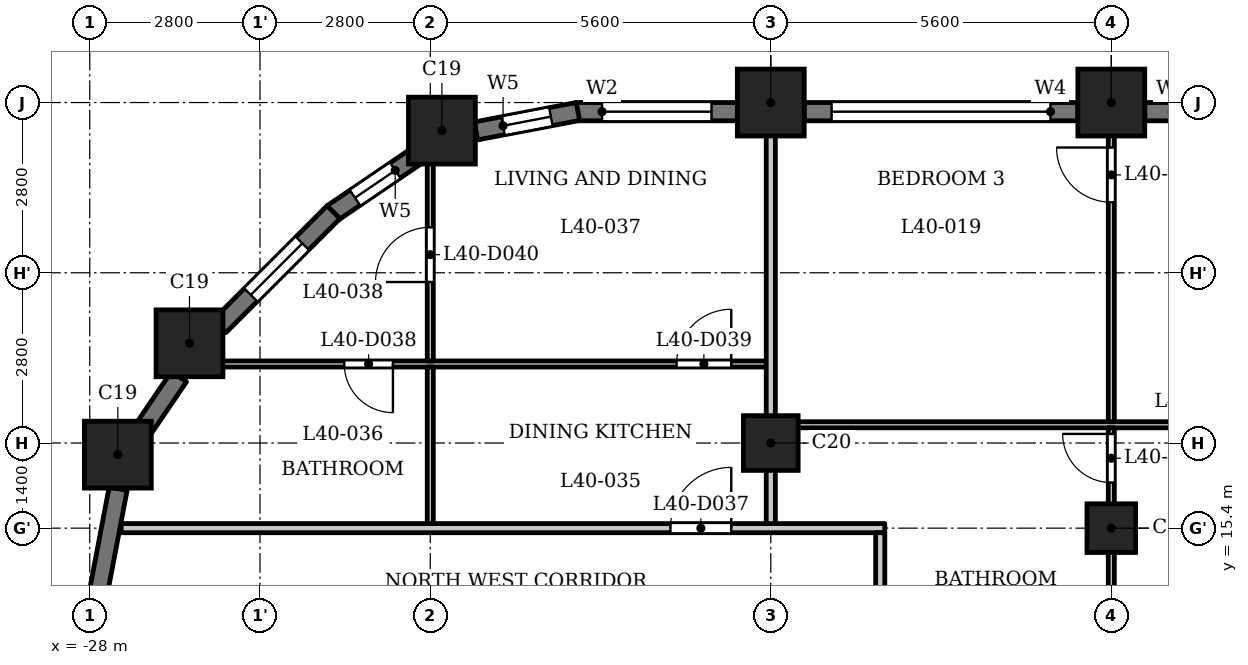
"""IFC4 building model, lengths in metres.
Left out: names, types, materials, properties, quantities, classifications, styles, units other than length and angle.
Written with IfcOpenShell. Run it as: python <this file> out.ifc"""

import sys

from ifc_helpers import new_model, si_unit, direction, frame, frame_2d, origin, origin_2d, place, context, subcontext, project, spatial, rectangle, extrude, element, fill, save


model = new_model("IFC4")
c1 = context("Model", 3, precision=1e-05, world=origin(), true_north=direction((0.0, 1.0)))
c2 = subcontext(c1, "Body", "Model", "MODEL_VIEW")
j1 = project(units=[si_unit("LENGTHUNIT", "METRE"), si_unit("PLANEANGLEUNIT", "RADIAN")], contexts=[c1])
p1 = place(None, origin())
s1 = spatial("IfcSite", under=j1, at=p1, CompositionType="ELEMENT")
p2 = place(p1, origin())
s2 = spatial("IfcBuilding", under=s1, at=p2, CompositionType="ELEMENT")
p3 = place(p2, frame((0.0, 0.0, 157.1)))
s3 = spatial("IfcBuildingStorey", under=s2, at=p3, CompositionType="ELEMENT", Elevation=157.1)
for number, where, z_axis, x_axis in (
    (1, (-11.2, 22.4, 0.0), (0.0, 0.0, 1.0), (1.0, 0.0, 0.0)),
    (2, (-16.8, 22.4, 0.0), (0.0, 0.0, 1.0), (1.0, 0.0, 0.0)),
    (3, (-22.209, 21.938, 0.0), (0.0, 0.0, 1.0), (1.0, 0.0, 0.0)),
    (4, (-26.36, 18.44, 0.0), (0.0, 0.0, 1.0), (1.0, 0.0, 0.0)),
    (5, (-27.538, 16.609, 0.0), (0.0, 0.0, 1.0), (1.0, 0.0, 0.0)),
):
    element("IfcColumn", number, at=place(p3, frame(where, z_axis=z_axis, x_axis=x_axis)), inside=s3, PredefinedType="COLUMN", context=c2, shape_type="SweptSolid", body=[
        extrude(rectangle(XDim=1.1, YDim=1.1, at=origin_2d()), origin(), (0.0, 0.0, 1.0), 3.5),
    ])
p4 = place(p3, frame((-16.8, 16.8, 0.0), z_axis=(0.0, 0.0, 1.0), x_axis=(1.0, 0.0, 0.0)))
e6 = element("IfcColumn", 6, at=p4, inside=s3, PredefinedType="COLUMN", context=c2, shape_type="SweptSolid", body=[
    extrude(rectangle(XDim=0.9, YDim=0.9, at=origin_2d()), origin(), (0.0, 0.0, 1.0), 3.5),
])
p5 = place(p3, frame((-11.2, 15.4, 0.0), z_axis=(0.0, 0.0, 1.0), x_axis=(1.0, 0.0, 0.0)))
e7 = element("IfcColumn", 7, at=p5, inside=s3, PredefinedType="COLUMN", context=c2, shape_type="SweptSolid", body=[
    extrude(rectangle(XDim=0.8, YDim=0.8, at=origin_2d()), origin(), (0.0, 0.0, 1.0), 3.5),
])
p6 = place(p3, frame((-6.15, 22.25, 0.0), z_axis=(0.0, 0.0, 1.0), x_axis=(-1.0, 0.0, 0.0)))
e8 = element("IfcWall", 8, at=p6, inside=s3, PredefinedType="SOLIDWALL", context=c2, shape_type="SweptSolid", body=[
    extrude(rectangle(XDim=4.5, YDim=0.3, at=frame_2d((2.25, 0.0))), origin(), (0.0, 0.0, 1.0), 2.45),
])
p7 = place(p6, frame((0.45, 0.0, 1.2)))
e9 = element("IfcOpeningElement", 9, at=p7, cuts=e8, PredefinedType="OPENING", context=c2, shape_type="SweptSolid", body=[
    extrude(rectangle(XDim=3.6, YDim=0.95, at=frame_2d((1.8, 0.475))), frame((0.0, 0.16, 0.0), z_axis=(0.0, -1.0, 0.0), x_axis=(1.0, 0.0, 0.0)), (0.0, 0.0, 1.0), 0.32),
])
p8 = place(p3, frame((-11.75, 22.25, 0.0), z_axis=(0.0, 0.0, 1.0), x_axis=(-1.0, 0.0, 0.0)))
e10 = element("IfcWall", 10, at=p8, inside=s3, PredefinedType="SOLIDWALL", context=c2, shape_type="SweptSolid", body=[
    extrude(rectangle(XDim=4.5, YDim=0.3, at=frame_2d((2.25, 0.0))), origin(), (0.0, 0.0, 1.0), 2.45),
])
p9 = place(p8, frame((0.45, 0.0, 1.2)))
e11 = element("IfcOpeningElement", 11, at=p9, cuts=e10, PredefinedType="OPENING", context=c2, shape_type="SweptSolid", body=[
    extrude(rectangle(XDim=3.6, YDim=0.95, at=frame_2d((1.8, 0.475))), frame((0.0, 0.16, 0.0), z_axis=(0.0, -1.0, 0.0), x_axis=(1.0, 0.0, 0.0)), (0.0, 0.0, 1.0), 0.32),
])
p10 = place(p3, frame((-17.35, 22.25, 0.0), z_axis=(0.0, 0.0, 1.0), x_axis=(-1.0, 0.0, 0.0)))
e12 = element("IfcWall", 12, at=p10, inside=s3, PredefinedType="SOLIDWALL", context=c2, shape_type="SweptSolid", body=[
    extrude(rectangle(XDim=2.65, YDim=0.3, at=frame_2d((1.325, 0.0))), origin(), (0.0, 0.0, 1.0), 2.45),
])
p11 = place(p10, frame((0.425, 0.0, 0.9)))
e13 = element("IfcOpeningElement", 13, at=p11, cuts=e12, PredefinedType="OPENING", context=c2, shape_type="SweptSolid", body=[
    extrude(rectangle(XDim=1.8, YDim=1.25, at=frame_2d((0.9, 0.625))), frame((0.0, 0.16, 0.0), z_axis=(0.0, -1.0, 0.0), x_axis=(1.0, 0.0, 0.0)), (0.0, 0.0, 1.0), 0.32),
])
p12 = place(p3, frame((-19.972, 22.253, 0.0), z_axis=(0.0, 0.0, 1.0), x_axis=(-0.982297206936, -0.187329114784, 0.0)))
e14 = element("IfcWall", 14, at=p12, inside=s3, PredefinedType="SOLIDWALL", context=c2, shape_type="SweptSolid", body=[
    extrude(rectangle(XDim=1.706, YDim=0.3, at=frame_2d((0.853, 0.0))), origin(), (0.0, 0.0, 1.0), 2.45),
])
p13 = place(p12, frame((0.453, 0.0, 0.6)))
e15 = element("IfcOpeningElement", 15, at=p13, cuts=e14, PredefinedType="OPENING", context=c2, shape_type="SweptSolid", body=[
    extrude(rectangle(XDim=0.8, YDim=1.55, at=frame_2d((0.4, 0.775))), frame((0.0, 0.16, 0.0), z_axis=(0.0, -1.0, 0.0), x_axis=(1.0, 0.0, 0.0)), (0.0, 0.0, 1.0), 0.32),
])
p14 = place(p3, frame((-22.602, 21.538, 0.0), z_axis=(0.0, 0.0, 1.0), x_axis=(-0.827040942766, -0.562141689424, 0.0)))
e16 = element("IfcWall", 16, at=p14, inside=s3, PredefinedType="SOLIDWALL", context=c2, shape_type="SweptSolid", body=[
    extrude(rectangle(XDim=1.706, YDim=0.3, at=frame_2d((0.853, 0.0))), origin(), (0.0, 0.0, 1.0), 2.45),
])
p15 = place(p14, frame((0.453, 0.0, 0.6)))
e17 = element("IfcOpeningElement", 17, at=p15, cuts=e16, PredefinedType="OPENING", context=c2, shape_type="SweptSolid", body=[
    extrude(rectangle(XDim=0.8, YDim=1.55, at=frame_2d((0.4, 0.775))), frame((0.0, 0.16, 0.0), z_axis=(0.0, -1.0, 0.0), x_axis=(1.0, 0.0, 0.0)), (0.0, 0.0, 1.0), 0.32),
])
p16 = place(p3, frame((-23.991, 20.597, 0.0), z_axis=(0.0, 0.0, 1.0), x_axis=(-0.707106781187, -0.707106781187, 0.0)))
e18 = element("IfcWall", 18, at=p16, inside=s3, PredefinedType="SOLIDWALL", context=c2, shape_type="SweptSolid", body=[
    extrude(rectangle(XDim=2.65, YDim=0.3, at=frame_2d((1.325, 0.0))), origin(), (0.0, 0.0, 1.0), 2.45),
])
p17 = place(p16, frame((0.725, 0.0, 0.6)))
e19 = element("IfcOpeningElement", 19, at=p17, cuts=e18, PredefinedType="OPENING", context=c2, shape_type="SweptSolid", body=[
    extrude(rectangle(XDim=1.2, YDim=1.55, at=frame_2d((0.6, 0.775))), frame((0.0, 0.16, 0.0), z_axis=(0.0, -1.0, 0.0), x_axis=(1.0, 0.0, 0.0)), (0.0, 0.0, 1.0), 0.32),
])
p18 = place(p3, frame((-26.532, 17.893, 0.0), z_axis=(0.0, 0.0, 1.0), x_axis=(-0.562105419172, -0.82706559458, 0.0)))
e20 = element("IfcWall", 20, at=p18, inside=s3, PredefinedType="SOLIDWALL", context=c2, shape_type="SweptSolid", body=[
    extrude(rectangle(XDim=1.077, YDim=0.3, at=frame_2d((0.539, 0.0))), origin(), (0.0, 0.0, 1.0), 3.2),
])
p19 = place(p3, frame((-27.533, 16.048, 0.0), z_axis=(0.0, 0.0, 1.0), x_axis=(-0.187302784601, -0.982302227871, 0.0)))
e21 = element("IfcWall", 21, at=p19, inside=s3, PredefinedType="SOLIDWALL", context=c2, shape_type="SweptSolid", body=[
    extrude(rectangle(XDim=1.706, YDim=0.3, at=frame_2d((0.853, 0.0))), origin(), (0.0, 0.0, 1.0), 2.45),
])
p20 = place(p3, frame((-27.484, 15.4, 0.0), z_axis=(0.0, 0.0, 1.0), x_axis=(1.0, 0.0, 0.0)))
e22 = element("IfcWall", 22, at=p20, inside=s3, PredefinedType="PARTITIONING", context=c2, shape_type="SweptSolid", body=[
    extrude(rectangle(XDim=12.559, YDim=0.15, at=frame_2d((6.279, 0.0))), origin(), (0.0, 0.0, 1.0), 3.2),
])
p21 = place(p20, frame((9.034, 0.0, 0.0)))
e23 = element("IfcOpeningElement", 23, at=p21, cuts=e22, PredefinedType="OPENING", context=c2, shape_type="SweptSolid", body=[
    extrude(rectangle(XDim=1.0, YDim=2.1, at=frame_2d((0.5, 1.05))), frame((0.0, 0.085, 0.0), z_axis=(0.0, -1.0, 0.0), x_axis=(1.0, 0.0, 0.0)), (0.0, 0.0, 1.0), 0.17),
])
p22 = place(p3, frame((-16.725, 17.1, 0.0), z_axis=(0.0, 0.0, 1.0), x_axis=(1.0, 0.0, 0.0)))
e24 = element("IfcWall", 24, at=p22, inside=s3, PredefinedType="PARTITIONING", context=c2, shape_type="SweptSolid", body=[
    extrude(rectangle(XDim=33.45, YDim=0.1, at=frame_2d((16.725, 0.0))), origin(), (0.0, 0.0, 1.0), 3.2),
])
p23 = place(p22, frame((11.925, 0.0, 0.0)))
e25 = element("IfcOpeningElement", 25, at=p23, cuts=e24, PredefinedType="OPENING", context=c2, shape_type="SweptSolid", body=[
    extrude(rectangle(XDim=0.9, YDim=2.1, at=frame_2d((0.45, 1.05))), frame((0.0, 0.06, 0.0), z_axis=(0.0, -1.0, 0.0), x_axis=(1.0, 0.0, 0.0)), (0.0, 0.0, 1.0), 0.12),
])
p24 = place(p22, frame((15.175, 0.0, 0.0)))
e26 = element("IfcOpeningElement", 26, at=p24, cuts=e24, PredefinedType="OPENING", context=c2, shape_type="SweptSolid", body=[
    extrude(rectangle(XDim=0.9, YDim=2.1, at=frame_2d((0.45, 1.05))), frame((0.0, 0.06, 0.0), z_axis=(0.0, -1.0, 0.0), x_axis=(1.0, 0.0, 0.0)), (0.0, 0.0, 1.0), 0.12),
])
p25 = place(p22, frame((6.575, 0.0, 0.0)))
e27 = element("IfcOpeningElement", 27, at=p25, cuts=e24, PredefinedType="OPENING", context=c2, shape_type="SweptSolid", body=[
    extrude(rectangle(XDim=0.9, YDim=2.1, at=frame_2d((0.45, 1.05))), frame((0.0, 0.06, 0.0), z_axis=(0.0, -1.0, 0.0), x_axis=(1.0, 0.0, 0.0)), (0.0, 0.0, 1.0), 0.12),
])
p26 = place(p22, frame((17.375, 0.0, 0.0)))
e28 = element("IfcOpeningElement", 28, at=p26, cuts=e24, PredefinedType="OPENING", context=c2, shape_type="SweptSolid", body=[
    extrude(rectangle(XDim=0.8, YDim=2.1, at=frame_2d((0.4, 1.05))), frame((0.0, 0.06, 0.0), z_axis=(0.0, -1.0, 0.0), x_axis=(1.0, 0.0, 0.0)), (0.0, 0.0, 1.0), 0.12),
])
p27 = place(p22, frame((20.025, 0.0, 0.0)))
e29 = element("IfcOpeningElement", 29, at=p27, cuts=e24, PredefinedType="OPENING", context=c2, shape_type="SweptSolid", body=[
    extrude(rectangle(XDim=0.9, YDim=2.1, at=frame_2d((0.45, 1.05))), frame((0.0, 0.06, 0.0), z_axis=(0.0, -1.0, 0.0), x_axis=(1.0, 0.0, 0.0)), (0.0, 0.0, 1.0), 0.12),
])
p28 = place(p22, frame((26.425, 0.0, 0.0)))
e30 = element("IfcOpeningElement", 30, at=p28, cuts=e24, PredefinedType="OPENING", context=c2, shape_type="SweptSolid", body=[
    extrude(rectangle(XDim=0.8, YDim=2.1, at=frame_2d((0.4, 1.05))), frame((0.0, 0.06, 0.0), z_axis=(0.0, -1.0, 0.0), x_axis=(1.0, 0.0, 0.0)), (0.0, 0.0, 1.0), 0.12),
])
p29 = place(p22, frame((23.025, 0.0, 0.0)))
e31 = element("IfcOpeningElement", 31, at=p29, cuts=e24, PredefinedType="OPENING", context=c2, shape_type="SweptSolid", body=[
    extrude(rectangle(XDim=0.9, YDim=2.1, at=frame_2d((0.45, 1.05))), frame((0.0, 0.06, 0.0), z_axis=(0.0, -1.0, 0.0), x_axis=(1.0, 0.0, 0.0)), (0.0, 0.0, 1.0), 0.12),
])
p30 = place(p22, frame((28.575, 0.0, 0.0)))
e32 = element("IfcOpeningElement", 32, at=p30, cuts=e24, PredefinedType="OPENING", context=c2, shape_type="SweptSolid", body=[
    extrude(rectangle(XDim=0.8, YDim=2.1, at=frame_2d((0.4, 1.05))), frame((0.0, 0.06, 0.0), z_axis=(0.0, -1.0, 0.0), x_axis=(1.0, 0.0, 0.0)), (0.0, 0.0, 1.0), 0.12),
])
p31 = place(p22, frame((30.725, 0.0, 0.0)))
e33 = element("IfcOpeningElement", 33, at=p31, cuts=e24, PredefinedType="OPENING", context=c2, shape_type="SweptSolid", body=[
    extrude(rectangle(XDim=0.9, YDim=2.1, at=frame_2d((0.45, 1.05))), frame((0.0, 0.06, 0.0), z_axis=(0.0, -1.0, 0.0), x_axis=(1.0, 0.0, 0.0)), (0.0, 0.0, 1.0), 0.12),
])
p32 = place(p3, frame((-26.44, 18.1, 0.0), z_axis=(0.0, 0.0, 1.0), x_axis=(1.0, 0.0, 0.0)))
e34 = element("IfcWall", 34, at=p32, inside=s3, PredefinedType="PARTITIONING", context=c2, shape_type="SweptSolid", body=[
    extrude(rectangle(XDim=9.565, YDim=0.1, at=frame_2d((4.782, 0.0))), origin(), (0.0, 0.0, 1.0), 3.2),
])
p33 = place(p32, frame((2.626, 0.0, 0.0)))
e35 = element("IfcOpeningElement", 35, at=p33, cuts=e34, PredefinedType="OPENING", context=c2, shape_type="SweptSolid", body=[
    extrude(rectangle(XDim=0.8, YDim=2.1, at=frame_2d((0.4, 1.05))), frame((0.0, 0.06, 0.0), z_axis=(0.0, -1.0, 0.0), x_axis=(1.0, 0.0, 0.0)), (0.0, 0.0, 1.0), 0.12),
])
p34 = place(p32, frame((8.09, 0.0, 0.0)))
e36 = element("IfcOpeningElement", 36, at=p34, cuts=e34, PredefinedType="OPENING", context=c2, shape_type="SweptSolid", body=[
    extrude(rectangle(XDim=0.9, YDim=2.1, at=frame_2d((0.45, 1.05))), frame((0.0, 0.06, 0.0), z_axis=(0.0, -1.0, 0.0), x_axis=(1.0, 0.0, 0.0)), (0.0, 0.0, 1.0), 0.12),
])
p35 = place(p3, frame((-22.4, 15.475, 0.0), z_axis=(0.0, 0.0, 1.0), x_axis=(0.0, 1.0, 0.0)))
e37 = element("IfcWall", 37, at=p35, inside=s3, PredefinedType="PARTITIONING", context=c2, shape_type="SweptSolid", body=[
    extrude(rectangle(XDim=2.575, YDim=0.1, at=frame_2d((1.288, 0.0))), origin(), (0.0, 0.0, 1.0), 3.2),
])
p36 = place(p3, frame((-22.4, 18.15, 0.0), z_axis=(0.0, 0.0, 1.0), x_axis=(0.0, 1.0, 0.0)))
e38 = element("IfcWall", 38, at=p36, inside=s3, PredefinedType="PARTITIONING", context=c2, shape_type="SweptSolid", body=[
    extrude(rectangle(XDim=3.57, YDim=0.1, at=frame_2d((1.785, 0.0))), origin(), (0.0, 0.0, 1.0), 3.2),
])
p37 = place(p36, frame((1.298, 0.0, 0.0)))
e39 = element("IfcOpeningElement", 39, at=p37, cuts=e38, PredefinedType="OPENING", context=c2, shape_type="SweptSolid", body=[
    extrude(rectangle(XDim=0.9, YDim=2.1, at=frame_2d((0.45, 1.05))), frame((0.0, 0.06, 0.0), z_axis=(0.0, -1.0, 0.0), x_axis=(1.0, 0.0, 0.0)), (0.0, 0.0, 1.0), 0.12),
])
p38 = place(p3, frame((-16.8, 15.475, 0.0), z_axis=(0.0, 0.0, 1.0), x_axis=(0.0, 1.0, 0.0)))
e40 = element("IfcWall", 40, at=p38, inside=s3, PredefinedType="PARTITIONING", context=c2, shape_type="SweptSolid", body=[
    extrude(rectangle(XDim=7.455, YDim=0.15, at=frame_2d((3.728, 0.0))), origin(), (0.0, 0.0, 1.0), 3.2),
])
p39 = place(p3, frame((-15.0, 13.275, 0.0), z_axis=(0.0, 0.0, 1.0), x_axis=(0.0, 1.0, 0.0)))
e41 = element("IfcWall", 41, at=p39, inside=s3, PredefinedType="PARTITIONING", context=c2, shape_type="SweptSolid", body=[
    extrude(rectangle(XDim=2.05, YDim=0.15, at=frame_2d((1.025, 0.0))), origin(), (0.0, 0.0, 1.0), 3.2),
])
p40 = place(p3, frame((-11.2, 13.275, 0.0), z_axis=(0.0, 0.0, 1.0), x_axis=(0.0, 1.0, 0.0)))
e42 = element("IfcWall", 42, at=p40, inside=s3, PredefinedType="PARTITIONING", context=c2, shape_type="SweptSolid", body=[
    extrude(rectangle(XDim=3.775, YDim=0.1, at=frame_2d((1.888, 0.0))), origin(), (0.0, 0.0, 1.0), 3.2),
])
p41 = place(p40, frame((2.875, 0.0, 0.0)))
e43 = element("IfcOpeningElement", 43, at=p41, cuts=e42, PredefinedType="OPENING", context=c2, shape_type="SweptSolid", body=[
    extrude(rectangle(XDim=0.8, YDim=2.1, at=frame_2d((0.4, 1.05))), frame((0.0, 0.06, 0.0), z_axis=(0.0, -1.0, 0.0), x_axis=(1.0, 0.0, 0.0)), (0.0, 0.0, 1.0), 0.12),
])
p42 = place(p3, frame((-11.2, 17.15, 0.0), z_axis=(0.0, 0.0, 1.0), x_axis=(0.0, 1.0, 0.0)))
e44 = element("IfcWall", 44, at=p42, inside=s3, PredefinedType="PARTITIONING", context=c2, shape_type="SweptSolid", body=[
    extrude(rectangle(XDim=5.78, YDim=0.1, at=frame_2d((2.89, 0.0))), origin(), (0.0, 0.0, 1.0), 3.2),
])
p43 = place(p42, frame((3.61, 0.0, 0.0)))
e45 = element("IfcOpeningElement", 45, at=p43, cuts=e44, PredefinedType="OPENING", context=c2, shape_type="SweptSolid", body=[
    extrude(rectangle(XDim=0.9, YDim=2.1, at=frame_2d((0.45, 1.05))), frame((0.0, 0.06, 0.0), z_axis=(0.0, -1.0, 0.0), x_axis=(1.0, 0.0, 0.0)), (0.0, 0.0, 1.0), 0.12),
])
p44 = place(p41, origin())
e46 = element("IfcDoor", 46, at=p44, inside=s3, OperationType="SINGLE_SWING_LEFT", PredefinedType="DOOR", context=c2, shape_type="SweptSolid", body=[
    extrude(rectangle(XDim=0.8, YDim=2.1, at=frame_2d((0.4, 1.05))), frame((0.0, 0.025, 0.0), z_axis=(0.0, -1.0, 0.0), x_axis=(1.0, 0.0, 0.0)), (0.0, 0.0, 1.0), 0.05),
])
fill(e43, e46)
p45 = place(p43, origin())
e47 = element("IfcDoor", 47, at=p45, inside=s3, OperationType="SINGLE_SWING_LEFT", PredefinedType="DOOR", context=c2, shape_type="SweptSolid", body=[
    extrude(rectangle(XDim=0.9, YDim=2.1, at=frame_2d((0.45, 1.05))), frame((0.0, 0.025, 0.0), z_axis=(0.0, -1.0, 0.0), x_axis=(1.0, 0.0, 0.0)), (0.0, 0.0, 1.0), 0.05),
])
fill(e45, e47)
p46 = place(p21, origin())
e48 = element("IfcDoor", 48, at=p46, inside=s3, OperationType="SINGLE_SWING_LEFT", PredefinedType="DOOR", context=c2, shape_type="SweptSolid", body=[
    extrude(rectangle(XDim=1.0, YDim=2.1, at=frame_2d((0.5, 1.05))), frame((0.0, 0.025, 0.0), z_axis=(0.0, -1.0, 0.0), x_axis=(1.0, 0.0, 0.0)), (0.0, 0.0, 1.0), 0.05),
])
fill(e23, e48)
p47 = place(p33, origin())
e49 = element("IfcDoor", 49, at=p47, inside=s3, OperationType="SINGLE_SWING_RIGHT", PredefinedType="DOOR", context=c2, shape_type="SweptSolid", body=[
    extrude(rectangle(XDim=0.8, YDim=2.1, at=frame_2d((0.4, 1.05))), frame((0.0, 0.025, 0.0), z_axis=(0.0, -1.0, 0.0), x_axis=(1.0, 0.0, 0.0)), (0.0, 0.0, 1.0), 0.05),
])
fill(e35, e49)
p48 = place(p34, origin())
e50 = element("IfcDoor", 50, at=p48, inside=s3, OperationType="SINGLE_SWING_LEFT", PredefinedType="DOOR", context=c2, shape_type="SweptSolid", body=[
    extrude(rectangle(XDim=0.9, YDim=2.1, at=frame_2d((0.45, 1.05))), frame((0.0, 0.025, 0.0), z_axis=(0.0, -1.0, 0.0), x_axis=(1.0, 0.0, 0.0)), (0.0, 0.0, 1.0), 0.05),
])
fill(e36, e50)
p49 = place(p37, origin())
e51 = element("IfcDoor", 51, at=p49, inside=s3, OperationType="SINGLE_SWING_RIGHT", PredefinedType="DOOR", context=c2, shape_type="SweptSolid", body=[
    extrude(rectangle(XDim=0.9, YDim=2.1, at=frame_2d((0.45, 1.05))), frame((0.0, 0.025, 0.0), z_axis=(0.0, -1.0, 0.0), x_axis=(1.0, 0.0, 0.0)), (0.0, 0.0, 1.0), 0.05),
])
fill(e39, e51)
p50 = place(p9, origin())
e52 = element("IfcWindow", 52, at=p50, inside=s3, PartitioningType="SINGLE_PANEL", PredefinedType="WINDOW", context=c2, shape_type="SweptSolid", body=[
    extrude(rectangle(XDim=3.6, YDim=0.95, at=frame_2d((1.8, 0.475))), frame((0.0, 0.03, 0.0), z_axis=(0.0, -1.0, 0.0), x_axis=(1.0, 0.0, 0.0)), (0.0, 0.0, 1.0), 0.06),
])
fill(e11, e52)
p51 = place(p11, origin())
e53 = element("IfcWindow", 53, at=p51, inside=s3, PartitioningType="SINGLE_PANEL", PredefinedType="WINDOW", context=c2, shape_type="SweptSolid", body=[
    extrude(rectangle(XDim=1.8, YDim=1.25, at=frame_2d((0.9, 0.625))), frame((0.0, 0.03, 0.0), z_axis=(0.0, -1.0, 0.0), x_axis=(1.0, 0.0, 0.0)), (0.0, 0.0, 1.0), 0.06),
])
fill(e13, e53)
p52 = place(p13, origin())
e54 = element("IfcWindow", 54, at=p52, inside=s3, PartitioningType="SINGLE_PANEL", PredefinedType="WINDOW", context=c2, shape_type="SweptSolid", body=[
    extrude(rectangle(XDim=0.8, YDim=1.55, at=frame_2d((0.4, 0.775))), frame((0.0, 0.03, 0.0), z_axis=(0.0, -1.0, 0.0), x_axis=(1.0, 0.0, 0.0)), (0.0, 0.0, 1.0), 0.06),
])
fill(e15, e54)
p53 = place(p15, origin())
e55 = element("IfcWindow", 55, at=p53, inside=s3, PartitioningType="SINGLE_PANEL", PredefinedType="WINDOW", context=c2, shape_type="SweptSolid", body=[
    extrude(rectangle(XDim=0.8, YDim=1.55, at=frame_2d((0.4, 0.775))), frame((0.0, 0.03, 0.0), z_axis=(0.0, -1.0, 0.0), x_axis=(1.0, 0.0, 0.0)), (0.0, 0.0, 1.0), 0.06),
])
fill(e17, e55)
p54 = place(p17, origin())
e56 = element("IfcWindow", 56, at=p54, inside=s3, PartitioningType="SINGLE_PANEL", PredefinedType="WINDOW", context=c2, shape_type="SweptSolid", body=[
    extrude(rectangle(XDim=1.2, YDim=1.55, at=frame_2d((0.6, 0.775))), frame((0.0, 0.03, 0.0), z_axis=(0.0, -1.0, 0.0), x_axis=(1.0, 0.0, 0.0)), (0.0, 0.0, 1.0), 0.06),
])
fill(e19, e56)
save(model, sys.argv[1])
